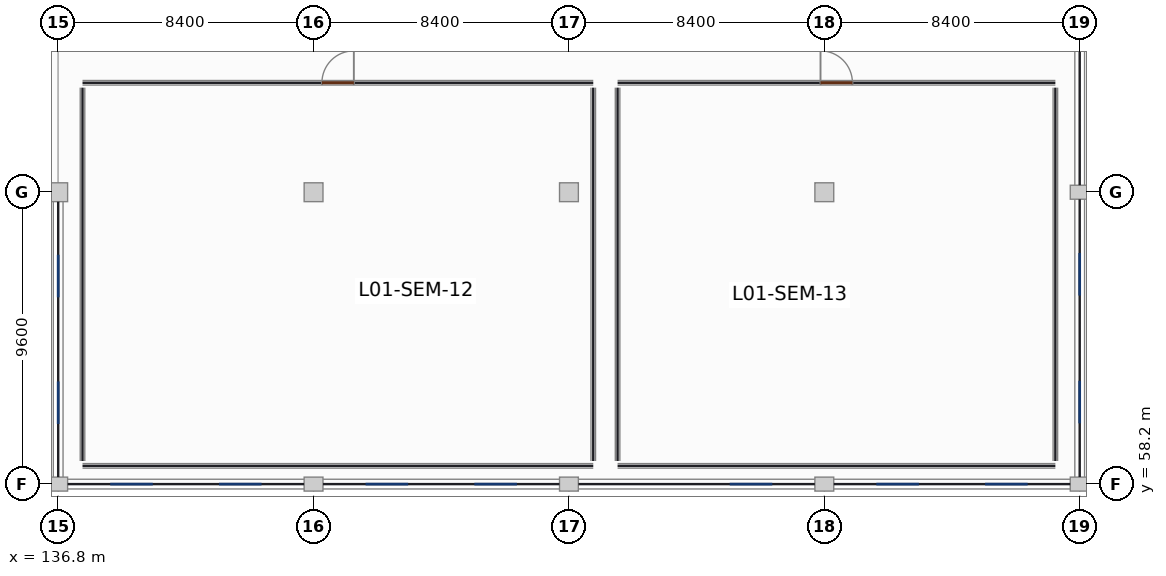
"""IFC4 building model, lengths in metres.
Left out: names, types, materials, properties, quantities, classifications, styles, units other than length and angle.
Written with IfcOpenShell. Run it as: python <this file> out.ifc"""

import sys

from ifc_helpers import new_model, si_unit, direction, frame, frame_2d, origin, origin_2d, place, context, subcontext, project, spatial, rectangle, extrude, element, fill, save


model = new_model("IFC4")
c1 = context("Model", 3, precision=1e-05, world=origin(), true_north=direction((0.0, 1.0)))
c2 = subcontext(c1, "Body", "Model", "MODEL_VIEW")
j1 = project(units=[si_unit("LENGTHUNIT", "METRE"), si_unit("PLANEANGLEUNIT", "RADIAN")], contexts=[c1])
p1 = place(None, origin())
s1 = spatial("IfcSite", under=j1, at=p1, CompositionType="ELEMENT")
p2 = place(p1, origin())
s2 = spatial("IfcBuilding", under=s1, at=p2, CompositionType="ELEMENT")
p3 = place(p2, frame((0.0, 0.0, 5.4)))
s3 = spatial("IfcBuildingStorey", under=s2, at=p3, CompositionType="ELEMENT", Elevation=5.4)
p4 = place(p3, frame((136.8, 58.2, 0.0), z_axis=(0.0, 0.0, 1.0), x_axis=(1.0, 0.0, 0.0)))
e1 = element("IfcColumn", 1, at=p4, inside=s3, PredefinedType="COLUMN", context=c2, shape_type="SweptSolid", body=[
    extrude(rectangle(XDim=0.62, YDim=0.46, at=origin_2d()), origin(), (0.0, 0.0, 1.0), 4.18),
])
p5 = place(p3, frame((136.8, 67.8, 0.0), z_axis=(0.0, 0.0, 1.0), x_axis=(1.0, 0.0, 0.0)))
e2 = element("IfcColumn", 2, at=p5, inside=s3, PredefinedType="COLUMN", context=c2, shape_type="SweptSolid", body=[
    extrude(rectangle(XDim=0.62, YDim=0.62, at=origin_2d()), origin(), (0.0, 0.0, 1.0), 4.18),
])
p6 = place(p3, frame((145.2, 58.2, 0.0), z_axis=(0.0, 0.0, 1.0), x_axis=(1.0, 0.0, 0.0)))
e3 = element("IfcColumn", 3, at=p6, inside=s3, PredefinedType="COLUMN", context=c2, shape_type="SweptSolid", body=[
    extrude(rectangle(XDim=0.62, YDim=0.46, at=origin_2d()), origin(), (0.0, 0.0, 1.0), 4.18),
])
p7 = place(p3, frame((145.2, 67.8, 0.0), z_axis=(0.0, 0.0, 1.0), x_axis=(1.0, 0.0, 0.0)))
e4 = element("IfcColumn", 4, at=p7, inside=s3, PredefinedType="COLUMN", context=c2, shape_type="SweptSolid", body=[
    extrude(rectangle(XDim=0.62, YDim=0.62, at=origin_2d()), origin(), (0.0, 0.0, 1.0), 4.18),
])
p8 = place(p3, frame((153.6, 58.2, 0.0), z_axis=(0.0, 0.0, 1.0), x_axis=(1.0, 0.0, 0.0)))
e5 = element("IfcColumn", 5, at=p8, inside=s3, PredefinedType="COLUMN", context=c2, shape_type="SweptSolid", body=[
    extrude(rectangle(XDim=0.62, YDim=0.46, at=origin_2d()), origin(), (0.0, 0.0, 1.0), 4.18),
])
p9 = place(p3, frame((153.6, 67.8, 0.0), z_axis=(0.0, 0.0, 1.0), x_axis=(1.0, 0.0, 0.0)))
e6 = element("IfcColumn", 6, at=p9, inside=s3, PredefinedType="COLUMN", context=c2, shape_type="SweptSolid", body=[
    extrude(rectangle(XDim=0.62, YDim=0.62, at=origin_2d()), origin(), (0.0, 0.0, 1.0), 4.18),
])
p10 = place(p3, frame((162.0, 58.2, 0.0), z_axis=(0.0, 0.0, 1.0), x_axis=(1.0, 0.0, 0.0)))
e7 = element("IfcColumn", 7, at=p10, inside=s3, PredefinedType="COLUMN", context=c2, shape_type="SweptSolid", body=[
    extrude(rectangle(XDim=0.62, YDim=0.46, at=origin_2d()), origin(), (0.0, 0.0, 1.0), 4.18),
])
p11 = place(p3, frame((162.0, 67.8, 0.0), z_axis=(0.0, 0.0, 1.0), x_axis=(1.0, 0.0, 0.0)))
e8 = element("IfcColumn", 8, at=p11, inside=s3, PredefinedType="COLUMN", context=c2, shape_type="SweptSolid", body=[
    extrude(rectangle(XDim=0.62, YDim=0.62, at=origin_2d()), origin(), (0.0, 0.0, 1.0), 4.18),
])
for number, where, z_axis, x_axis in (
    (9, (170.4, 58.2, 0.0), (0.0, 0.0, 1.0), (1.0, 0.0, 0.0)),
    (10, (170.4, 67.8, 0.0), (0.0, 0.0, 1.0), (1.0, 0.0, 0.0)),
):
    element("IfcColumn", number, at=place(p3, frame(where, z_axis=z_axis, x_axis=x_axis)), inside=s3, PredefinedType="COLUMN", context=c2, shape_type="SweptSolid", body=[
        extrude(rectangle(XDim=0.62, YDim=0.46, at=origin_2d()), origin(), (0.0, 0.0, 1.0), 4.18),
    ])
p12 = place(p3, frame((170.4, 58.432, 0.0), z_axis=(0.0, 0.0, 1.0), x_axis=(0.0, 1.0, 0.0)))
e11 = element("IfcWall", 11, at=p12, inside=s3, PredefinedType="SOLIDWALL", context=c2, shape_type="SweptSolid", body=[
    extrude(rectangle(XDim=9.136, YDim=0.32, at=frame_2d((4.568, 0.0))), origin(), (0.0, 0.0, 1.0), 3.38),
])
p13 = place(p12, frame((1.767, 0.0, 0.85)))
e12 = element("IfcOpeningElement", 12, at=p13, cuts=e11, PredefinedType="OPENING", context=c2, shape_type="SweptSolid", body=[
    extrude(rectangle(XDim=1.4, YDim=1.65, at=frame_2d((0.7, 0.825))), frame((0.0, 0.17, 0.0), z_axis=(0.0, -1.0, 0.0), x_axis=(1.0, 0.0, 0.0)), (0.0, 0.0, 1.0), 0.34),
])
p14 = place(p12, frame((5.969, 0.0, 0.85)))
e13 = element("IfcOpeningElement", 13, at=p14, cuts=e11, PredefinedType="OPENING", context=c2, shape_type="SweptSolid", body=[
    extrude(rectangle(XDim=1.4, YDim=1.65, at=frame_2d((0.7, 0.825))), frame((0.0, 0.17, 0.0), z_axis=(0.0, -1.0, 0.0), x_axis=(1.0, 0.0, 0.0)), (0.0, 0.0, 1.0), 0.34),
])
p15 = place(p3, frame((170.4, 68.032, 0.0), z_axis=(0.0, 0.0, 1.0), x_axis=(0.0, 1.0, 0.0)))
e14 = element("IfcWall", 14, at=p15, inside=s3, PredefinedType="SOLIDWALL", context=c2, shape_type="SweptSolid", body=[
    extrude(rectangle(XDim=9.136, YDim=0.32, at=frame_2d((4.568, 0.0))), origin(), (0.0, 0.0, 1.0), 3.38),
])
p16 = place(p15, frame((5.969, 0.0, 0.85)))
e15 = element("IfcOpeningElement", 15, at=p16, cuts=e14, PredefinedType="OPENING", context=c2, shape_type="SweptSolid", body=[
    extrude(rectangle(XDim=1.4, YDim=1.65, at=frame_2d((0.7, 0.825))), frame((0.0, 0.17, 0.0), z_axis=(0.0, -1.0, 0.0), x_axis=(1.0, 0.0, 0.0)), (0.0, 0.0, 1.0), 0.34),
])
p17 = place(p3, frame((137.112, 58.2, 0.0), z_axis=(0.0, 0.0, 1.0), x_axis=(1.0, 0.0, 0.0)))
e16 = element("IfcWall", 16, at=p17, inside=s3, PredefinedType="SOLIDWALL", context=c2, shape_type="SweptSolid", body=[
    extrude(rectangle(XDim=7.776, YDim=0.32, at=frame_2d((3.888, 0.0))), origin(), (0.0, 0.0, 1.0), 3.38),
])
p18 = place(p17, frame((1.399, 0.0, 0.85)))
e17 = element("IfcOpeningElement", 17, at=p18, cuts=e16, PredefinedType="OPENING", context=c2, shape_type="SweptSolid", body=[
    extrude(rectangle(XDim=1.4, YDim=1.65, at=frame_2d((0.7, 0.825))), frame((0.0, 0.17, 0.0), z_axis=(0.0, -1.0, 0.0), x_axis=(1.0, 0.0, 0.0)), (0.0, 0.0, 1.0), 0.34),
])
p19 = place(p17, frame((4.977, 0.0, 0.85)))
e18 = element("IfcOpeningElement", 18, at=p19, cuts=e16, PredefinedType="OPENING", context=c2, shape_type="SweptSolid", body=[
    extrude(rectangle(XDim=1.4, YDim=1.65, at=frame_2d((0.7, 0.825))), frame((0.0, 0.17, 0.0), z_axis=(0.0, -1.0, 0.0), x_axis=(1.0, 0.0, 0.0)), (0.0, 0.0, 1.0), 0.34),
])
p20 = place(p3, frame((145.512, 58.2, 0.0), z_axis=(0.0, 0.0, 1.0), x_axis=(1.0, 0.0, 0.0)))
e19 = element("IfcWall", 19, at=p20, inside=s3, PredefinedType="SOLIDWALL", context=c2, shape_type="SweptSolid", body=[
    extrude(rectangle(XDim=7.776, YDim=0.32, at=frame_2d((3.888, 0.0))), origin(), (0.0, 0.0, 1.0), 3.38),
])
p21 = place(p20, frame((1.399, 0.0, 0.85)))
e20 = element("IfcOpeningElement", 20, at=p21, cuts=e19, PredefinedType="OPENING", context=c2, shape_type="SweptSolid", body=[
    extrude(rectangle(XDim=1.4, YDim=1.65, at=frame_2d((0.7, 0.825))), frame((0.0, 0.17, 0.0), z_axis=(0.0, -1.0, 0.0), x_axis=(1.0, 0.0, 0.0)), (0.0, 0.0, 1.0), 0.34),
])
p22 = place(p20, frame((4.977, 0.0, 0.85)))
e21 = element("IfcOpeningElement", 21, at=p22, cuts=e19, PredefinedType="OPENING", context=c2, shape_type="SweptSolid", body=[
    extrude(rectangle(XDim=1.4, YDim=1.65, at=frame_2d((0.7, 0.825))), frame((0.0, 0.17, 0.0), z_axis=(0.0, -1.0, 0.0), x_axis=(1.0, 0.0, 0.0)), (0.0, 0.0, 1.0), 0.34),
])
p23 = place(p3, frame((153.912, 58.2, 0.0), z_axis=(0.0, 0.0, 1.0), x_axis=(1.0, 0.0, 0.0)))
e22 = element("IfcWall", 22, at=p23, inside=s3, PredefinedType="SOLIDWALL", context=c2, shape_type="SweptSolid", body=[
    extrude(rectangle(XDim=7.776, YDim=0.32, at=frame_2d((3.888, 0.0))), origin(), (0.0, 0.0, 1.0), 3.38),
])
p24 = place(p23, frame((4.977, 0.0, 0.85)))
e23 = element("IfcOpeningElement", 23, at=p24, cuts=e22, PredefinedType="OPENING", context=c2, shape_type="SweptSolid", body=[
    extrude(rectangle(XDim=1.4, YDim=1.65, at=frame_2d((0.7, 0.825))), frame((0.0, 0.17, 0.0), z_axis=(0.0, -1.0, 0.0), x_axis=(1.0, 0.0, 0.0)), (0.0, 0.0, 1.0), 0.34),
])
p25 = place(p3, frame((162.312, 58.2, 0.0), z_axis=(0.0, 0.0, 1.0), x_axis=(1.0, 0.0, 0.0)))
e24 = element("IfcWall", 24, at=p25, inside=s3, PredefinedType="SOLIDWALL", context=c2, shape_type="SweptSolid", body=[
    extrude(rectangle(XDim=7.776, YDim=0.32, at=frame_2d((3.888, 0.0))), origin(), (0.0, 0.0, 1.0), 3.38),
])
p26 = place(p25, frame((1.399, 0.0, 0.85)))
e25 = element("IfcOpeningElement", 25, at=p26, cuts=e24, PredefinedType="OPENING", context=c2, shape_type="SweptSolid", body=[
    extrude(rectangle(XDim=1.4, YDim=1.65, at=frame_2d((0.7, 0.825))), frame((0.0, 0.17, 0.0), z_axis=(0.0, -1.0, 0.0), x_axis=(1.0, 0.0, 0.0)), (0.0, 0.0, 1.0), 0.34),
])
p27 = place(p25, frame((4.977, 0.0, 0.85)))
e26 = element("IfcOpeningElement", 26, at=p27, cuts=e24, PredefinedType="OPENING", context=c2, shape_type="SweptSolid", body=[
    extrude(rectangle(XDim=1.4, YDim=1.65, at=frame_2d((0.7, 0.825))), frame((0.0, 0.17, 0.0), z_axis=(0.0, -1.0, 0.0), x_axis=(1.0, 0.0, 0.0)), (0.0, 0.0, 1.0), 0.34),
])
p28 = place(p3, frame((136.8, 58.432, 0.0), z_axis=(0.0, 0.0, 1.0), x_axis=(0.0, 1.0, 0.0)))
e27 = element("IfcWall", 27, at=p28, inside=s3, PredefinedType="SOLIDWALL", context=c2, shape_type="SweptSolid", body=[
    extrude(rectangle(XDim=9.056, YDim=0.32, at=frame_2d((4.528, 0.0))), origin(), (0.0, 0.0, 1.0), 3.38),
])
p29 = place(p28, frame((1.745, 0.0, 0.85)))
e28 = element("IfcOpeningElement", 28, at=p29, cuts=e27, PredefinedType="OPENING", context=c2, shape_type="SweptSolid", body=[
    extrude(rectangle(XDim=1.4, YDim=1.65, at=frame_2d((0.7, 0.825))), frame((0.0, 0.17, 0.0), z_axis=(0.0, -1.0, 0.0), x_axis=(1.0, 0.0, 0.0)), (0.0, 0.0, 1.0), 0.34),
])
p30 = place(p28, frame((5.911, 0.0, 0.85)))
e29 = element("IfcOpeningElement", 29, at=p30, cuts=e27, PredefinedType="OPENING", context=c2, shape_type="SweptSolid", body=[
    extrude(rectangle(XDim=1.4, YDim=1.65, at=frame_2d((0.7, 0.825))), frame((0.0, 0.17, 0.0), z_axis=(0.0, -1.0, 0.0), x_axis=(1.0, 0.0, 0.0)), (0.0, 0.0, 1.0), 0.34),
])
p31 = place(p3, frame((137.6, 58.8, 0.0), z_axis=(0.0, 0.0, 1.0), x_axis=(1.0, 0.0, 0.0)))
e30 = element("IfcWall", 30, at=p31, inside=s3, PredefinedType="PARTITIONING", context=c2, shape_type="SweptSolid", body=[
    extrude(rectangle(XDim=16.8, YDim=0.15, at=frame_2d((8.4, 0.0))), origin(), (0.0, 0.0, 1.0), 3.22),
])
p32 = place(p3, frame((137.6, 71.4, 0.0), z_axis=(0.0, 0.0, 1.0), x_axis=(1.0, 0.0, 0.0)))
e31 = element("IfcWall", 31, at=p32, inside=s3, PredefinedType="PARTITIONING", context=c2, shape_type="SweptSolid", body=[
    extrude(rectangle(XDim=16.8, YDim=0.15, at=frame_2d((8.4, 0.0))), origin(), (0.0, 0.0, 1.0), 3.22),
])
p33 = place(p32, frame((7.875, 0.0, 0.0)))
e32 = element("IfcOpeningElement", 32, at=p33, cuts=e31, PredefinedType="OPENING", context=c2, shape_type="SweptSolid", body=[
    extrude(rectangle(XDim=1.05, YDim=2.2, at=frame_2d((0.525, 1.1))), frame((0.0, 0.085, 0.0), z_axis=(0.0, -1.0, 0.0), x_axis=(1.0, 0.0, 0.0)), (0.0, 0.0, 1.0), 0.17),
])
for number, where, z_axis, x_axis in (
    (33, (137.6, 58.96, 0.0), (0.0, 0.0, 1.0), (0.0, 1.0, 0.0)),
    (34, (154.4, 58.96, 0.0), (0.0, 0.0, 1.0), (0.0, 1.0, 0.0)),
):
    element("IfcWall", number, at=place(p3, frame(where, z_axis=z_axis, x_axis=x_axis)), inside=s3, PredefinedType="PARTITIONING", context=c2, shape_type="SweptSolid", body=[
        extrude(rectangle(XDim=12.28, YDim=0.15, at=frame_2d((6.14, 0.0))), origin(), (0.0, 0.0, 1.0), 3.22),
    ])
p34 = place(p3, frame((155.2, 58.8, 0.0), z_axis=(0.0, 0.0, 1.0), x_axis=(1.0, 0.0, 0.0)))
e35 = element("IfcWall", 35, at=p34, inside=s3, PredefinedType="PARTITIONING", context=c2, shape_type="SweptSolid", body=[
    extrude(rectangle(XDim=14.4, YDim=0.15, at=frame_2d((7.2, 0.0))), origin(), (0.0, 0.0, 1.0), 3.22),
])
p35 = place(p3, frame((155.2, 71.4, 0.0), z_axis=(0.0, 0.0, 1.0), x_axis=(1.0, 0.0, 0.0)))
e36 = element("IfcWall", 36, at=p35, inside=s3, PredefinedType="PARTITIONING", context=c2, shape_type="SweptSolid", body=[
    extrude(rectangle(XDim=14.4, YDim=0.15, at=frame_2d((7.2, 0.0))), origin(), (0.0, 0.0, 1.0), 3.22),
])
p36 = place(p35, frame((6.675, 0.0, 0.0)))
e37 = element("IfcOpeningElement", 37, at=p36, cuts=e36, PredefinedType="OPENING", context=c2, shape_type="SweptSolid", body=[
    extrude(rectangle(XDim=1.05, YDim=2.2, at=frame_2d((0.525, 1.1))), frame((0.0, 0.085, 0.0), z_axis=(0.0, -1.0, 0.0), x_axis=(1.0, 0.0, 0.0)), (0.0, 0.0, 1.0), 0.17),
])
for number, where, z_axis, x_axis in (
    (38, (155.2, 58.96, 0.0), (0.0, 0.0, 1.0), (0.0, 1.0, 0.0)),
    (39, (169.6, 58.96, 0.0), (0.0, 0.0, 1.0), (0.0, 1.0, 0.0)),
):
    element("IfcWall", number, at=place(p3, frame(where, z_axis=z_axis, x_axis=x_axis)), inside=s3, PredefinedType="PARTITIONING", context=c2, shape_type="SweptSolid", body=[
        extrude(rectangle(XDim=12.28, YDim=0.15, at=frame_2d((6.14, 0.0))), origin(), (0.0, 0.0, 1.0), 3.22),
    ])
p37 = place(p13, origin())
e40 = element("IfcWindow", 40, at=p37, inside=s3, PartitioningType="SINGLE_PANEL", PredefinedType="WINDOW", context=c2, shape_type="SweptSolid", body=[
    extrude(rectangle(XDim=1.4, YDim=1.65, at=frame_2d((0.7, 0.825))), frame((0.0, 0.03, 0.0), z_axis=(0.0, -1.0, 0.0), x_axis=(1.0, 0.0, 0.0)), (0.0, 0.0, 1.0), 0.06),
])
fill(e12, e40)
p38 = place(p14, origin())
e41 = element("IfcWindow", 41, at=p38, inside=s3, PartitioningType="SINGLE_PANEL", PredefinedType="WINDOW", context=c2, shape_type="SweptSolid", body=[
    extrude(rectangle(XDim=1.4, YDim=1.65, at=frame_2d((0.7, 0.825))), frame((0.0, 0.03, 0.0), z_axis=(0.0, -1.0, 0.0), x_axis=(1.0, 0.0, 0.0)), (0.0, 0.0, 1.0), 0.06),
])
fill(e13, e41)
p39 = place(p18, origin())
e42 = element("IfcWindow", 42, at=p39, inside=s3, PartitioningType="SINGLE_PANEL", PredefinedType="WINDOW", context=c2, shape_type="SweptSolid", body=[
    extrude(rectangle(XDim=1.4, YDim=1.65, at=frame_2d((0.7, 0.825))), frame((0.0, 0.03, 0.0), z_axis=(0.0, -1.0, 0.0), x_axis=(1.0, 0.0, 0.0)), (0.0, 0.0, 1.0), 0.06),
])
fill(e17, e42)
p40 = place(p19, origin())
e43 = element("IfcWindow", 43, at=p40, inside=s3, PartitioningType="SINGLE_PANEL", PredefinedType="WINDOW", context=c2, shape_type="SweptSolid", body=[
    extrude(rectangle(XDim=1.4, YDim=1.65, at=frame_2d((0.7, 0.825))), frame((0.0, 0.03, 0.0), z_axis=(0.0, -1.0, 0.0), x_axis=(1.0, 0.0, 0.0)), (0.0, 0.0, 1.0), 0.06),
])
fill(e18, e43)
p41 = place(p21, origin())
e44 = element("IfcWindow", 44, at=p41, inside=s3, PartitioningType="SINGLE_PANEL", PredefinedType="WINDOW", context=c2, shape_type="SweptSolid", body=[
    extrude(rectangle(XDim=1.4, YDim=1.65, at=frame_2d((0.7, 0.825))), frame((0.0, 0.03, 0.0), z_axis=(0.0, -1.0, 0.0), x_axis=(1.0, 0.0, 0.0)), (0.0, 0.0, 1.0), 0.06),
])
fill(e20, e44)
p42 = place(p22, origin())
e45 = element("IfcWindow", 45, at=p42, inside=s3, PartitioningType="SINGLE_PANEL", PredefinedType="WINDOW", context=c2, shape_type="SweptSolid", body=[
    extrude(rectangle(XDim=1.4, YDim=1.65, at=frame_2d((0.7, 0.825))), frame((0.0, 0.03, 0.0), z_axis=(0.0, -1.0, 0.0), x_axis=(1.0, 0.0, 0.0)), (0.0, 0.0, 1.0), 0.06),
])
fill(e21, e45)
p43 = place(p24, origin())
e46 = element("IfcWindow", 46, at=p43, inside=s3, PartitioningType="SINGLE_PANEL", PredefinedType="WINDOW", context=c2, shape_type="SweptSolid", body=[
    extrude(rectangle(XDim=1.4, YDim=1.65, at=frame_2d((0.7, 0.825))), frame((0.0, 0.03, 0.0), z_axis=(0.0, -1.0, 0.0), x_axis=(1.0, 0.0, 0.0)), (0.0, 0.0, 1.0), 0.06),
])
fill(e23, e46)
p44 = place(p26, origin())
e47 = element("IfcWindow", 47, at=p44, inside=s3, PartitioningType="SINGLE_PANEL", PredefinedType="WINDOW", context=c2, shape_type="SweptSolid", body=[
    extrude(rectangle(XDim=1.4, YDim=1.65, at=frame_2d((0.7, 0.825))), frame((0.0, 0.03, 0.0), z_axis=(0.0, -1.0, 0.0), x_axis=(1.0, 0.0, 0.0)), (0.0, 0.0, 1.0), 0.06),
])
fill(e25, e47)
p45 = place(p27, origin())
e48 = element("IfcWindow", 48, at=p45, inside=s3, PartitioningType="SINGLE_PANEL", PredefinedType="WINDOW", context=c2, shape_type="SweptSolid", body=[
    extrude(rectangle(XDim=1.4, YDim=1.65, at=frame_2d((0.7, 0.825))), frame((0.0, 0.03, 0.0), z_axis=(0.0, -1.0, 0.0), x_axis=(1.0, 0.0, 0.0)), (0.0, 0.0, 1.0), 0.06),
])
fill(e26, e48)
p46 = place(p29, origin())
e49 = element("IfcWindow", 49, at=p46, inside=s3, PartitioningType="SINGLE_PANEL", PredefinedType="WINDOW", context=c2, shape_type="SweptSolid", body=[
    extrude(rectangle(XDim=1.4, YDim=1.65, at=frame_2d((0.7, 0.825))), frame((0.0, 0.03, 0.0), z_axis=(0.0, -1.0, 0.0), x_axis=(1.0, 0.0, 0.0)), (0.0, 0.0, 1.0), 0.06),
])
fill(e28, e49)
p47 = place(p30, origin())
e50 = element("IfcWindow", 50, at=p47, inside=s3, PartitioningType="SINGLE_PANEL", PredefinedType="WINDOW", context=c2, shape_type="SweptSolid", body=[
    extrude(rectangle(XDim=1.4, YDim=1.65, at=frame_2d((0.7, 0.825))), frame((0.0, 0.03, 0.0), z_axis=(0.0, -1.0, 0.0), x_axis=(1.0, 0.0, 0.0)), (0.0, 0.0, 1.0), 0.06),
])
fill(e29, e50)
p48 = place(p33, origin())
e51 = element("IfcDoor", 51, at=p48, inside=s3, OperationType="SINGLE_SWING_RIGHT", PredefinedType="DOOR", context=c2, shape_type="SweptSolid", body=[
    extrude(rectangle(XDim=1.05, YDim=2.2, at=frame_2d((0.525, 1.1))), frame((0.0, 0.025, 0.0), z_axis=(0.0, -1.0, 0.0), x_axis=(1.0, 0.0, 0.0)), (0.0, 0.0, 1.0), 0.05),
])
fill(e32, e51)
p49 = place(p36, origin())
e52 = element("IfcDoor", 52, at=p49, inside=s3, OperationType="SINGLE_SWING_LEFT", PredefinedType="DOOR", context=c2, shape_type="SweptSolid", body=[
    extrude(rectangle(XDim=1.05, YDim=2.2, at=frame_2d((0.525, 1.1))), frame((0.0, 0.025, 0.0), z_axis=(0.0, -1.0, 0.0), x_axis=(1.0, 0.0, 0.0)), (0.0, 0.0, 1.0), 0.05),
])
fill(e37, e52)
save(model, sys.argv[1])
